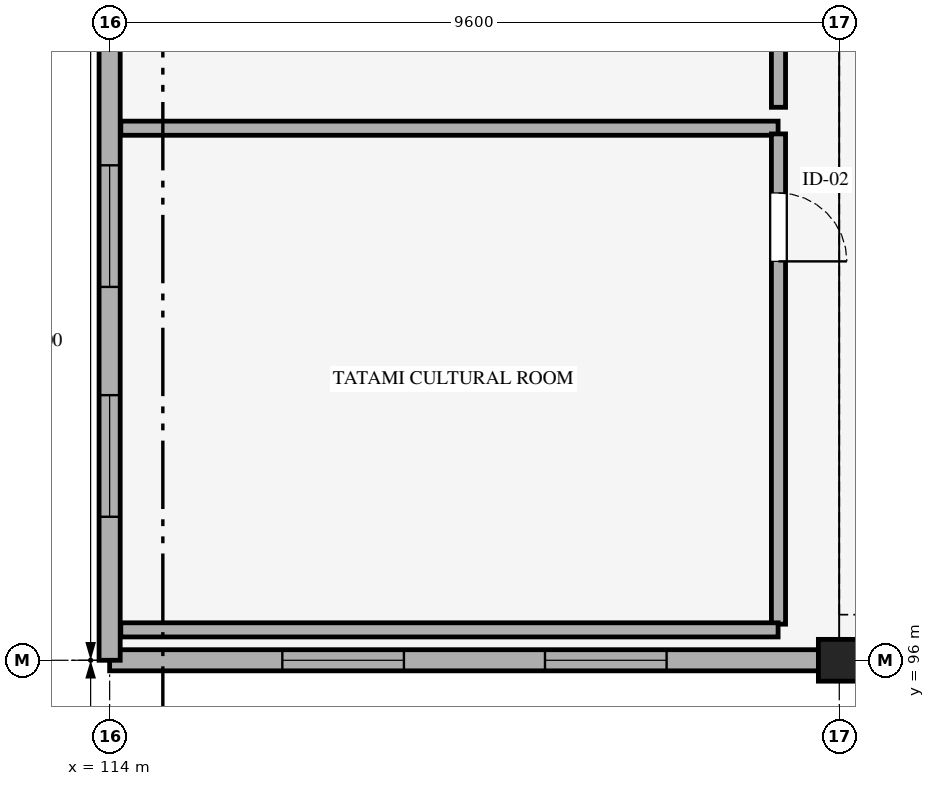
"""IFC4 building model, lengths in metres.
Left out: names, types, materials, properties, quantities, classifications, styles, units other than length and angle.
Written with IfcOpenShell. Run it as: python <this file> out.ifc"""

import sys

from ifc_helpers import new_model, si_unit, direction, frame, frame_2d, origin, origin_2d, place, context, subcontext, project, spatial, rectangle, extrude, element, fill, save


model = new_model("IFC4")
c1 = context("Model", 3, precision=1e-05, world=origin(), true_north=direction((0.0, 1.0)))
c2 = subcontext(c1, "Body", "Model", "MODEL_VIEW")
j1 = project(units=[si_unit("LENGTHUNIT", "METRE"), si_unit("PLANEANGLEUNIT", "RADIAN")], contexts=[c1])
p1 = place(None, origin())
s1 = spatial("IfcSite", under=j1, at=p1, CompositionType="ELEMENT")
p2 = place(p1, origin())
s2 = spatial("IfcBuilding", under=s1, at=p2, CompositionType="ELEMENT")
p3 = place(p2, frame((0.0, 0.0, 17.4)))
s3 = spatial("IfcBuildingStorey", under=s2, at=p3, CompositionType="ELEMENT", Elevation=17.4)
p4 = place(p3, frame((123.6, 96.0, 0.0), z_axis=(0.0, 0.0, 1.0), x_axis=(1.0, 0.0, 0.0)))
e1 = element("IfcColumn", 1, at=p4, inside=s3, PredefinedType="COLUMN", context=c2, shape_type="SweptSolid", body=[
    extrude(rectangle(XDim=0.55, YDim=0.55, at=origin_2d()), origin(), (0.0, 0.0, 1.0), 4.2),
])
p5 = place(p3, frame((133.2, 96.0, 0.0), z_axis=(0.0, 0.0, 1.0), x_axis=(-1.0, 0.0, 0.0)))
e2 = element("IfcWall", 2, at=p5, inside=s3, PredefinedType="STANDARD", context=c2, shape_type="SweptSolid", body=[
    extrude(rectangle(XDim=9.6, YDim=0.278, at=frame_2d((4.8, 0.0))), origin(), (0.0, 0.0, 1.0), 3.255),
])
p6 = place(p5, frame((2.322, 0.0, 0.95)))
e3 = element("IfcOpeningElement", 3, at=p6, cuts=e2, PredefinedType="OPENING", context=c2, shape_type="SweptSolid", body=[
    extrude(rectangle(XDim=1.5, YDim=1.5, at=frame_2d((0.75, 0.75))), frame((0.0, 0.149, 0.0), z_axis=(0.0, -1.0, 0.0), x_axis=(1.0, 0.0, 0.0)), (0.0, 0.0, 1.0), 0.298),
])
p7 = place(p5, frame((5.778, 0.0, 0.95)))
e4 = element("IfcOpeningElement", 4, at=p7, cuts=e2, PredefinedType="OPENING", context=c2, shape_type="SweptSolid", body=[
    extrude(rectangle(XDim=1.5, YDim=1.5, at=frame_2d((0.75, 0.75))), frame((0.0, 0.149, 0.0), z_axis=(0.0, -1.0, 0.0), x_axis=(1.0, 0.0, 0.0)), (0.0, 0.0, 1.0), 0.298),
])
p8 = place(p3, frame((123.6, 96.0, 0.0), z_axis=(0.0, 0.0, 1.0), x_axis=(-1.0, 0.0, 0.0)))
e5 = element("IfcWall", 5, at=p8, inside=s3, PredefinedType="STANDARD", context=c2, shape_type="SweptSolid", body=[
    extrude(rectangle(XDim=9.6, YDim=0.278, at=frame_2d((4.8, 0.0))), origin(), (0.0, 0.0, 1.0), 3.255),
])
p9 = place(p8, frame((2.272, 0.0, 0.95)))
e6 = element("IfcOpeningElement", 6, at=p9, cuts=e5, PredefinedType="OPENING", context=c2, shape_type="SweptSolid", body=[
    extrude(rectangle(XDim=1.6, YDim=1.6, at=frame_2d((0.8, 0.8))), frame((0.0, 0.149, 0.0), z_axis=(0.0, -1.0, 0.0), x_axis=(1.0, 0.0, 0.0)), (0.0, 0.0, 1.0), 0.298),
])
p10 = place(p8, frame((5.728, 0.0, 0.95)))
e7 = element("IfcOpeningElement", 7, at=p10, cuts=e5, PredefinedType="OPENING", context=c2, shape_type="SweptSolid", body=[
    extrude(rectangle(XDim=1.6, YDim=1.6, at=frame_2d((0.8, 0.8))), frame((0.0, 0.149, 0.0), z_axis=(0.0, -1.0, 0.0), x_axis=(1.0, 0.0, 0.0)), (0.0, 0.0, 1.0), 0.298),
])
p11 = place(p3, frame((114.0, 96.0, 0.0), z_axis=(0.0, 0.0, 1.0), x_axis=(0.0, 1.0, 0.0)))
e8 = element("IfcWall", 8, at=p11, inside=s3, PredefinedType="STANDARD", context=c2, shape_type="SweptSolid", body=[
    extrude(rectangle(XDim=8.4, YDim=0.278, at=frame_2d((4.2, 0.0))), origin(), (0.0, 0.0, 1.0), 3.305),
])
p12 = place(p11, frame((1.888, 0.0, 0.95)))
e9 = element("IfcOpeningElement", 9, at=p12, cuts=e8, PredefinedType="OPENING", context=c2, shape_type="SweptSolid", body=[
    extrude(rectangle(XDim=1.6, YDim=1.6, at=frame_2d((0.8, 0.8))), frame((0.0, 0.149, 0.0), z_axis=(0.0, -1.0, 0.0), x_axis=(1.0, 0.0, 0.0)), (0.0, 0.0, 1.0), 0.298),
])
p13 = place(p11, frame((4.912, 0.0, 0.95)))
e10 = element("IfcOpeningElement", 10, at=p13, cuts=e8, PredefinedType="OPENING", context=c2, shape_type="SweptSolid", body=[
    extrude(rectangle(XDim=1.6, YDim=1.6, at=frame_2d((0.8, 0.8))), frame((0.0, 0.149, 0.0), z_axis=(0.0, -1.0, 0.0), x_axis=(1.0, 0.0, 0.0)), (0.0, 0.0, 1.0), 0.298),
])
p14 = place(p3, frame((114.147, 103.0, 0.0), z_axis=(0.0, 0.0, 1.0), x_axis=(1.0, 0.0, 0.0)))
e11 = element("IfcWall", 11, at=p14, inside=s3, PredefinedType="STANDARD", context=c2, shape_type="SweptSolid", body=[
    extrude(rectangle(XDim=8.648, YDim=0.186, at=frame_2d((4.324, 0.0))), origin(), (0.0, 0.0, 1.0), 3.98),
])
p15 = place(p3, frame((122.8, 102.925, 0.0), z_axis=(0.0, 0.0, 1.0), x_axis=(0.0, -1.0, 0.0)))
e12 = element("IfcWall", 12, at=p15, inside=s3, PredefinedType="STANDARD", context=c2, shape_type="SweptSolid", body=[
    extrude(rectangle(XDim=6.45, YDim=0.186, at=frame_2d((3.225, 0.0))), origin(), (0.0, 0.0, 1.0), 3.98),
])
p16 = place(p15, frame((0.777, 0.0, 0.0)))
e13 = element("IfcOpeningElement", 13, at=p16, cuts=e12, PredefinedType="OPENING", context=c2, shape_type="SweptSolid", body=[
    extrude(rectangle(XDim=0.9, YDim=2.1, at=frame_2d((0.45, 1.05))), frame((0.0, 0.103, 0.0), z_axis=(0.0, -1.0, 0.0), x_axis=(1.0, 0.0, 0.0)), (0.0, 0.0, 1.0), 0.206),
])
p17 = place(p3, frame((122.795, 96.4, 0.0), z_axis=(0.0, 0.0, 1.0), x_axis=(-1.0, 0.0, 0.0)))
e14 = element("IfcWall", 14, at=p17, inside=s3, PredefinedType="STANDARD", context=c2, shape_type="SweptSolid", body=[
    extrude(rectangle(XDim=8.648, YDim=0.186, at=frame_2d((4.324, 0.0))), origin(), (0.0, 0.0, 1.0), 3.98),
])
p18 = place(p3, frame((122.8, 108.725, 0.0), z_axis=(0.0, 0.0, 1.0), x_axis=(0.0, -1.0, 0.0)))
e15 = element("IfcWall", 15, at=p18, inside=s3, PredefinedType="STANDARD", context=c2, shape_type="SweptSolid", body=[
    extrude(rectangle(XDim=5.45, YDim=0.186, at=frame_2d((2.725, 0.0))), origin(), (0.0, 0.0, 1.0), 3.305),
])
p19 = place(p18, frame((2.0, 0.0, 0.0)))
e16 = element("IfcOpeningElement", 16, at=p19, cuts=e15, PredefinedType="OPENING", context=c2, shape_type="SweptSolid", body=[
    extrude(rectangle(XDim=1.45, YDim=2.22, at=frame_2d((0.725, 1.11))), frame((0.0, 0.103, 0.0), z_axis=(0.0, -1.0, 0.0), x_axis=(1.0, 0.0, 0.0)), (0.0, 0.0, 1.0), 0.206),
])
p20 = place(p9, origin())
e17 = element("IfcWindow", 17, at=p20, inside=s3, PartitioningType="SINGLE_PANEL", PredefinedType="WINDOW", context=c2, shape_type="SweptSolid", body=[
    extrude(rectangle(XDim=1.6, YDim=1.6, at=frame_2d((0.8, 0.8))), frame((0.0, 0.03, 0.0), z_axis=(0.0, -1.0, 0.0), x_axis=(1.0, 0.0, 0.0)), (0.0, 0.0, 1.0), 0.06),
])
fill(e6, e17)
p21 = place(p10, origin())
e18 = element("IfcWindow", 18, at=p21, inside=s3, PartitioningType="SINGLE_PANEL", PredefinedType="WINDOW", context=c2, shape_type="SweptSolid", body=[
    extrude(rectangle(XDim=1.6, YDim=1.6, at=frame_2d((0.8, 0.8))), frame((0.0, 0.03, 0.0), z_axis=(0.0, -1.0, 0.0), x_axis=(1.0, 0.0, 0.0)), (0.0, 0.0, 1.0), 0.06),
])
fill(e7, e18)
p22 = place(p12, origin())
e19 = element("IfcWindow", 19, at=p22, inside=s3, PartitioningType="SINGLE_PANEL", PredefinedType="WINDOW", context=c2, shape_type="SweptSolid", body=[
    extrude(rectangle(XDim=1.6, YDim=1.6, at=frame_2d((0.8, 0.8))), frame((0.0, 0.03, 0.0), z_axis=(0.0, -1.0, 0.0), x_axis=(1.0, 0.0, 0.0)), (0.0, 0.0, 1.0), 0.06),
])
fill(e9, e19)
p23 = place(p13, origin())
e20 = element("IfcWindow", 20, at=p23, inside=s3, PartitioningType="SINGLE_PANEL", PredefinedType="WINDOW", context=c2, shape_type="SweptSolid", body=[
    extrude(rectangle(XDim=1.6, YDim=1.6, at=frame_2d((0.8, 0.8))), frame((0.0, 0.03, 0.0), z_axis=(0.0, -1.0, 0.0), x_axis=(1.0, 0.0, 0.0)), (0.0, 0.0, 1.0), 0.06),
])
fill(e10, e20)
p24 = place(p16, origin())
e21 = element("IfcDoor", 21, at=p24, inside=s3, OperationType="SINGLE_SWING_RIGHT", PredefinedType="DOOR", context=c2, shape_type="SweptSolid", body=[
    extrude(rectangle(XDim=0.9, YDim=2.1, at=frame_2d((0.45, 1.05))), frame((0.0, 0.025, 0.0), z_axis=(0.0, -1.0, 0.0), x_axis=(1.0, 0.0, 0.0)), (0.0, 0.0, 1.0), 0.05),
])
fill(e13, e21)
save(model, sys.argv[1])
